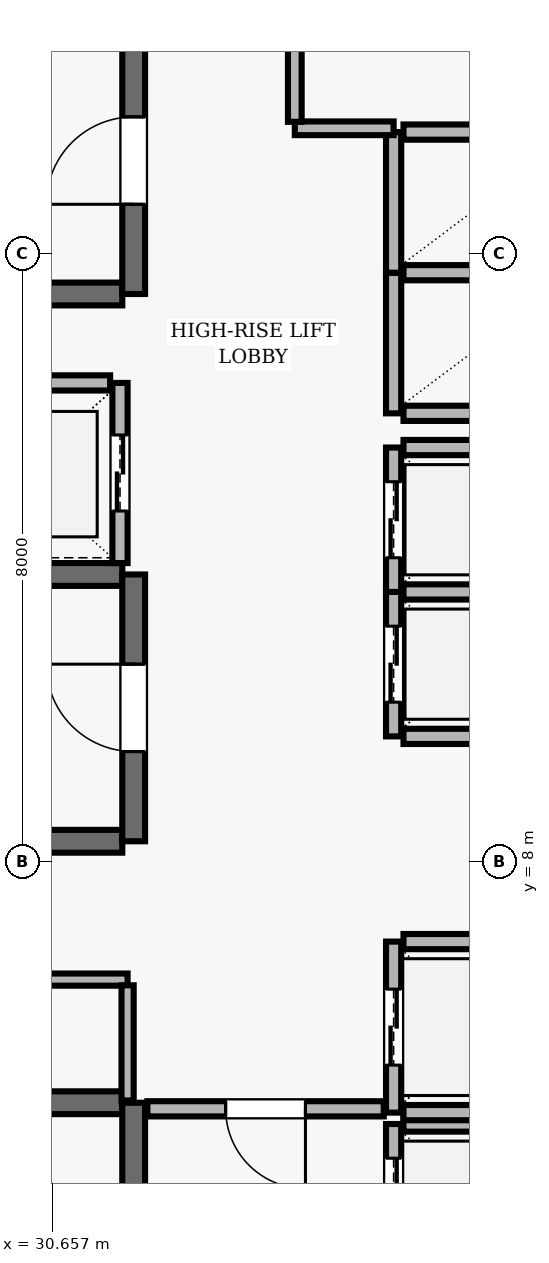
"""IFC4 building model, lengths in metres.
Left out: names, types, materials, properties, quantities, classifications, styles, units other than length and angle.
Written with IfcOpenShell. Run it as: python <this file> out.ifc"""

import sys

from ifc_helpers import new_model, si_unit, direction, frame, frame_2d, origin, place, context, subcontext, project, spatial, rectangle, extrude, element, fill, save


model = new_model("IFC4")
c1 = context("Model", 3, precision=1e-05, world=origin(), true_north=direction((0.0, 1.0)))
c2 = subcontext(c1, "Body", "Model", "MODEL_VIEW")
j1 = project(units=[si_unit("LENGTHUNIT", "METRE"), si_unit("PLANEANGLEUNIT", "RADIAN")], contexts=[c1])
p1 = place(None, origin())
s1 = spatial("IfcSite", under=j1, at=p1, CompositionType="ELEMENT")
p2 = place(p1, origin())
s2 = spatial("IfcBuilding", under=s1, at=p2, CompositionType="ELEMENT")
p3 = place(p2, frame((0.0, 0.0, 283.3)))
s3 = spatial("IfcBuildingStorey", under=s2, at=p3, CompositionType="ELEMENT", Elevation=283.3)
p4 = place(p3, frame((31.58, 4.83, 0.0), z_axis=(0.0, 0.0, 1.0), x_axis=(-1.0, 0.0, 0.0)))
e1 = element("IfcWall", 1, at=p4, inside=s3, PredefinedType="SHEAR", context=c2, shape_type="SweptSolid", body=[
    extrude(rectangle(XDim=8.36, YDim=0.3, at=frame_2d((4.18, 0.0))), origin(), (0.0, 0.0, 1.0), 3.69),
])
p5 = place(p3, frame((31.73, 0.96, 0.0), z_axis=(0.0, 0.0, 1.0), x_axis=(0.0, 1.0, 0.0)))
e2 = element("IfcWall", 2, at=p5, inside=s3, PredefinedType="SHEAR", context=c2, shape_type="SweptSolid", body=[
    extrude(rectangle(XDim=3.87, YDim=0.3, at=frame_2d((1.935, 0.0))), origin(), (0.0, 0.0, 1.0), 3.69),
])
p6 = place(p5, frame((1.54, 0.0, 0.0)))
e3 = element("IfcOpeningElement", 3, at=p6, cuts=e2, PredefinedType="OPENING", context=c2, shape_type="SweptSolid", body=[
    extrude(rectangle(XDim=1.15, YDim=2.15, at=frame_2d((0.575, 1.075))), frame((0.0, 0.16, 0.0), z_axis=(0.0, -1.0, 0.0), x_axis=(1.0, 0.0, 0.0)), (0.0, 0.0, 1.0), 0.32),
])
p7 = place(p3, frame((23.22, 15.47, 0.0), z_axis=(0.0, 0.0, 1.0), x_axis=(1.0, 0.0, 0.0)))
e4 = element("IfcWall", 4, at=p7, inside=s3, PredefinedType="SHEAR", context=c2, shape_type="SweptSolid", body=[
    extrude(rectangle(XDim=8.36, YDim=0.3, at=frame_2d((4.18, 0.0))), origin(), (0.0, 0.0, 1.0), 3.69),
])
p8 = place(p3, frame((31.73, 15.47, 0.0), z_axis=(0.0, 0.0, 1.0), x_axis=(0.0, 1.0, 0.0)))
e5 = element("IfcWall", 5, at=p8, inside=s3, PredefinedType="SHEAR", context=c2, shape_type="SweptSolid", body=[
    extrude(rectangle(XDim=3.51, YDim=0.3, at=frame_2d((1.755, 0.0))), origin(), (0.0, 0.0, 1.0), 3.69),
])
p9 = place(p8, frame((1.18, 0.0, 0.0)))
e6 = element("IfcOpeningElement", 6, at=p9, cuts=e5, PredefinedType="OPENING", context=c2, shape_type="SweptSolid", body=[
    extrude(rectangle(XDim=1.15, YDim=2.15, at=frame_2d((0.575, 1.075))), frame((0.0, 0.16, 0.0), z_axis=(0.0, -1.0, 0.0), x_axis=(1.0, 0.0, 0.0)), (0.0, 0.0, 1.0), 0.32),
])
for number, where, z_axis, x_axis in (
    (7, (31.58, 11.78, 0.0), (0.0, 0.0, 1.0), (-1.0, 0.0, 0.0)),
    (8, (23.22, 8.27, 0.0), (0.0, 0.0, 1.0), (1.0, 0.0, 0.0)),
):
    element("IfcWall", number, at=place(p3, frame(where, z_axis=z_axis, x_axis=x_axis)), inside=s3, PredefinedType="SHEAR", context=c2, shape_type="SweptSolid", body=[
        extrude(rectangle(XDim=8.36, YDim=0.3, at=frame_2d((4.18, 0.0))), origin(), (0.0, 0.0, 1.0), 3.69),
    ])
p10 = place(p3, frame((31.73, 8.27, 0.0), z_axis=(0.0, 0.0, 1.0), x_axis=(0.0, 1.0, 0.0)))
e9 = element("IfcWall", 9, at=p10, inside=s3, PredefinedType="SHEAR", context=c2, shape_type="SweptSolid", body=[
    extrude(rectangle(XDim=3.51, YDim=0.3, at=frame_2d((1.755, 0.0))), origin(), (0.0, 0.0, 1.0), 3.69),
])
p11 = place(p10, frame((1.18, 0.0, 0.0)))
e10 = element("IfcOpeningElement", 10, at=p11, cuts=e9, PredefinedType="OPENING", context=c2, shape_type="SweptSolid", body=[
    extrude(rectangle(XDim=1.15, YDim=2.15, at=frame_2d((0.575, 1.075))), frame((0.0, 0.16, 0.0), z_axis=(0.0, -1.0, 0.0), x_axis=(1.0, 0.0, 0.0)), (0.0, 0.0, 1.0), 0.32),
])
p12 = place(p3, frame((35.15, 4.55, 0.0), z_axis=(0.0, 0.0, 1.0), x_axis=(0.0, -1.0, 0.0)))
e11 = element("IfcWall", 11, at=p12, inside=s3, PredefinedType="SOLIDWALL", context=c2, shape_type="SweptSolid", body=[
    extrude(rectangle(XDim=2.1, YDim=0.2, at=frame_2d((1.05, 0.0))), origin(), (0.0, 0.0, 1.0), 3.69),
])
p13 = place(p12, frame((0.45, 0.0, 0.0)))
e12 = element("IfcOpeningElement", 12, at=p13, cuts=e11, PredefinedType="OPENING", context=c2, shape_type="SweptSolid", body=[
    extrude(rectangle(XDim=1.2, YDim=2.15, at=frame_2d((0.6, 1.075))), frame((0.0, 0.11, 0.0), z_axis=(0.0, -1.0, 0.0), x_axis=(1.0, 0.0, 0.0)), (0.0, 0.0, 1.0), 0.22),
])
p14 = place(p3, frame((37.42, 4.55, 0.0), z_axis=(0.0, 0.0, 1.0), x_axis=(-1.0, 0.0, 0.0)))
e13 = element("IfcWall", 13, at=p14, inside=s3, PredefinedType="SOLIDWALL", context=c2, shape_type="SweptSolid", body=[
    extrude(rectangle(XDim=2.14, YDim=0.2, at=frame_2d((1.07, 0.0))), origin(), (0.0, 0.0, 1.0), 3.69),
])
p15 = place(p3, frame((35.15, 6.95, 0.0), z_axis=(0.0, 0.0, 1.0), x_axis=(0.0, -1.0, 0.0)))
e14 = element("IfcWall", 14, at=p15, inside=s3, PredefinedType="SOLIDWALL", context=c2, shape_type="SweptSolid", body=[
    extrude(rectangle(XDim=2.25, YDim=0.2, at=frame_2d((1.125, 0.0))), origin(), (0.0, 0.0, 1.0), 3.69),
])
p16 = place(p15, frame((0.625, 0.0, 0.0)))
e15 = element("IfcOpeningElement", 15, at=p16, cuts=e14, PredefinedType="OPENING", context=c2, shape_type="SweptSolid", body=[
    extrude(rectangle(XDim=1.0, YDim=2.1, at=frame_2d((0.5, 1.05))), frame((0.0, 0.11, 0.0), z_axis=(0.0, -1.0, 0.0), x_axis=(1.0, 0.0, 0.0)), (0.0, 0.0, 1.0), 0.22),
])
for number, where, z_axis, x_axis in (
    (16, (35.28, 4.7, 0.0), (0.0, 0.0, 1.0), (1.0, 0.0, 0.0)),
    (17, (37.42, 6.95, 0.0), (0.0, 0.0, 1.0), (-1.0, 0.0, 0.0)),
):
    element("IfcWall", number, at=place(p3, frame(where, z_axis=z_axis, x_axis=x_axis)), inside=s3, PredefinedType="SOLIDWALL", context=c2, shape_type="SweptSolid", body=[
        extrude(rectangle(XDim=2.14, YDim=0.2, at=frame_2d((1.07, 0.0))), origin(), (0.0, 0.0, 1.0), 3.69),
    ])
p17 = place(p3, frame((35.15, 11.55, 0.0), z_axis=(0.0, 0.0, 1.0), x_axis=(0.0, -1.0, 0.0)))
e18 = element("IfcWall", 18, at=p17, inside=s3, PredefinedType="SOLIDWALL", context=c2, shape_type="SweptSolid", body=[
    extrude(rectangle(XDim=1.9, YDim=0.2, at=frame_2d((0.95, 0.0))), origin(), (0.0, 0.0, 1.0), 3.69),
])
p18 = place(p17, frame((0.45, 0.0, 0.0)))
e19 = element("IfcOpeningElement", 19, at=p18, cuts=e18, PredefinedType="OPENING", context=c2, shape_type="SweptSolid", body=[
    extrude(rectangle(XDim=1.0, YDim=2.1, at=frame_2d((0.5, 1.05))), frame((0.0, 0.11, 0.0), z_axis=(0.0, -1.0, 0.0), x_axis=(1.0, 0.0, 0.0)), (0.0, 0.0, 1.0), 0.22),
])
for number, where, z_axis, x_axis in (
    (20, (35.28, 9.65, 0.0), (0.0, 0.0, 1.0), (1.0, 0.0, 0.0)),
    (21, (37.42, 11.55, 0.0), (0.0, 0.0, 1.0), (-1.0, 0.0, 0.0)),
):
    element("IfcWall", number, at=place(p3, frame(where, z_axis=z_axis, x_axis=x_axis)), inside=s3, PredefinedType="SOLIDWALL", context=c2, shape_type="SweptSolid", body=[
        extrude(rectangle(XDim=2.14, YDim=0.2, at=frame_2d((1.07, 0.0))), origin(), (0.0, 0.0, 1.0), 3.69),
    ])
p19 = place(p3, frame((35.15, 13.45, 0.0), z_axis=(0.0, 0.0, 1.0), x_axis=(0.0, -1.0, 0.0)))
e22 = element("IfcWall", 22, at=p19, inside=s3, PredefinedType="SOLIDWALL", context=c2, shape_type="SweptSolid", body=[
    extrude(rectangle(XDim=1.9, YDim=0.2, at=frame_2d((0.95, 0.0))), origin(), (0.0, 0.0, 1.0), 3.69),
])
p20 = place(p19, frame((0.45, 0.0, 0.0)))
e23 = element("IfcOpeningElement", 23, at=p20, cuts=e22, PredefinedType="OPENING", context=c2, shape_type="SweptSolid", body=[
    extrude(rectangle(XDim=1.0, YDim=2.1, at=frame_2d((0.5, 1.05))), frame((0.0, 0.11, 0.0), z_axis=(0.0, -1.0, 0.0), x_axis=(1.0, 0.0, 0.0)), (0.0, 0.0, 1.0), 0.22),
])
p21 = place(p3, frame((37.42, 13.45, 0.0), z_axis=(0.0, 0.0, 1.0), x_axis=(-1.0, 0.0, 0.0)))
e24 = element("IfcWall", 24, at=p21, inside=s3, PredefinedType="SOLIDWALL", context=c2, shape_type="SweptSolid", body=[
    extrude(rectangle(XDim=2.14, YDim=0.2, at=frame_2d((1.07, 0.0))), origin(), (0.0, 0.0, 1.0), 3.69),
])
p22 = place(p3, frame((31.55, 11.93, 0.0), z_axis=(0.0, 0.0, 1.0), x_axis=(0.0, 1.0, 0.0)))
e25 = element("IfcWall", 25, at=p22, inside=s3, PredefinedType="SOLIDWALL", context=c2, shape_type="SweptSolid", body=[
    extrude(rectangle(XDim=2.37, YDim=0.2, at=frame_2d((1.185, 0.0))), origin(), (0.0, 0.0, 1.0), 3.69),
])
p23 = place(p22, frame((0.685, 0.0, 0.0)))
e26 = element("IfcOpeningElement", 26, at=p23, cuts=e25, PredefinedType="OPENING", context=c2, shape_type="SweptSolid", body=[
    extrude(rectangle(XDim=1.0, YDim=2.1, at=frame_2d((0.5, 1.05))), frame((0.0, 0.11, 0.0), z_axis=(0.0, -1.0, 0.0), x_axis=(1.0, 0.0, 0.0)), (0.0, 0.0, 1.0), 0.22),
])
p24 = place(p3, frame((31.42, 14.3, 0.0), z_axis=(0.0, 0.0, 1.0), x_axis=(-1.0, 0.0, 0.0)))
e27 = element("IfcWall", 27, at=p24, inside=s3, PredefinedType="SOLIDWALL", context=c2, shape_type="SweptSolid", body=[
    extrude(rectangle(XDim=2.44, YDim=0.2, at=frame_2d((1.22, 0.0))), origin(), (0.0, 0.0, 1.0), 3.69),
])
p25 = place(p3, frame((35.15, 15.75, 0.0), z_axis=(0.0, 0.0, 1.0), x_axis=(0.0, -1.0, 0.0)))
e28 = element("IfcWall", 28, at=p25, inside=s3, PredefinedType="SOLIDWALL", context=c2, shape_type="SweptSolid", body=[
    extrude(rectangle(XDim=1.85, YDim=0.2, at=frame_2d((0.925, 0.0))), origin(), (0.0, 0.0, 1.0), 3.69),
])
for number, where, z_axis, x_axis in (
    (29, (35.28, 13.9, 0.0), (0.0, 0.0, 1.0), (1.0, 0.0, 0.0)),
    (30, (37.42, 15.75, 0.0), (0.0, 0.0, 1.0), (-1.0, 0.0, 0.0)),
):
    element("IfcWall", number, at=place(p3, frame(where, z_axis=z_axis, x_axis=x_axis)), inside=s3, PredefinedType="SOLIDWALL", context=c2, shape_type="SweptSolid", body=[
        extrude(rectangle(XDim=2.14, YDim=0.2, at=frame_2d((1.07, 0.0))), origin(), (0.0, 0.0, 1.0), 3.69),
    ])
p26 = place(p3, frame((35.15, 17.6, 0.0), z_axis=(0.0, 0.0, 1.0), x_axis=(0.0, -1.0, 0.0)))
e31 = element("IfcWall", 31, at=p26, inside=s3, PredefinedType="SOLIDWALL", context=c2, shape_type="SweptSolid", body=[
    extrude(rectangle(XDim=1.85, YDim=0.2, at=frame_2d((0.925, 0.0))), origin(), (0.0, 0.0, 1.0), 3.69),
])
p27 = place(p3, frame((37.42, 17.6, 0.0), z_axis=(0.0, 0.0, 1.0), x_axis=(-1.0, 0.0, 0.0)))
e32 = element("IfcWall", 32, at=p27, inside=s3, PredefinedType="SOLIDWALL", context=c2, shape_type="SweptSolid", body=[
    extrude(rectangle(XDim=2.14, YDim=0.2, at=frame_2d((1.07, 0.0))), origin(), (0.0, 0.0, 1.0), 3.69),
])
p28 = place(p3, frame((28.55, 6.45, 0.0), z_axis=(0.0, 0.0, 1.0), x_axis=(1.0, 0.0, 0.0)))
e33 = element("IfcWall", 33, at=p28, inside=s3, PredefinedType="PARTITIONING", context=c2, shape_type="SweptSolid", body=[
    extrude(rectangle(XDim=3.1, YDim=0.16, at=frame_2d((1.55, 0.0))), origin(), (0.0, 0.0, 1.0), 3.69),
])
p29 = place(p28, frame((1.11, 0.0, 0.0)))
e34 = element("IfcOpeningElement", 34, at=p29, cuts=e33, PredefinedType="OPENING", context=c2, shape_type="SweptSolid", body=[
    extrude(rectangle(XDim=0.88, YDim=2.1, at=frame_2d((0.44, 1.05))), frame((0.0, 0.09, 0.0), z_axis=(0.0, -1.0, 0.0), x_axis=(1.0, 0.0, 0.0)), (0.0, 0.0, 1.0), 0.18),
])
p30 = place(p3, frame((33.85, 17.65, 0.0), z_axis=(0.0, 0.0, 1.0), x_axis=(1.0, 0.0, 0.0)))
e35 = element("IfcWall", 35, at=p30, inside=s3, PredefinedType="PARTITIONING", context=c2, shape_type="SweptSolid", body=[
    extrude(rectangle(XDim=1.3, YDim=0.18, at=frame_2d((0.65, 0.0))), origin(), (0.0, 0.0, 1.0), 3.69),
])
p31 = place(p3, frame((35.02, 4.75, 0.0), z_axis=(0.0, 0.0, 1.0), x_axis=(-1.0, 0.0, 0.0)))
e36 = element("IfcWall", 36, at=p31, inside=s3, PredefinedType="SOLIDWALL", context=c2, shape_type="SweptSolid", body=[
    extrude(rectangle(XDim=3.11, YDim=0.2, at=frame_2d((1.555, 0.0))), origin(), (0.0, 0.0, 1.0), 3.69),
])
p32 = place(p31, frame((1.03, 0.0, 0.0)))
e37 = element("IfcOpeningElement", 37, at=p32, cuts=e36, PredefinedType="OPENING", context=c2, shape_type="SweptSolid", body=[
    extrude(rectangle(XDim=1.05, YDim=2.15, at=frame_2d((0.525, 1.075))), frame((0.0, 0.11, 0.0), z_axis=(0.0, -1.0, 0.0), x_axis=(1.0, 0.0, 0.0)), (0.0, 0.0, 1.0), 0.22),
])
p33 = place(p3, frame((31.65, 4.86, 0.0), z_axis=(0.0, 0.0, 1.0), x_axis=(0.0, 1.0, 0.0)))
e38 = element("IfcWall", 38, at=p33, inside=s3, PredefinedType="PARTITIONING", context=c2, shape_type="SweptSolid", body=[
    extrude(rectangle(XDim=1.515, YDim=0.16, at=frame_2d((0.757, 0.0))), origin(), (0.0, 0.0, 1.0), 3.69),
])
p34 = place(p3, frame((33.85, 17.735, 0.0), z_axis=(0.0, 0.0, 1.0), x_axis=(0.0, 1.0, 0.0)))
e39 = element("IfcWall", 39, at=p34, inside=s3, PredefinedType="PARTITIONING", context=c2, shape_type="SweptSolid", body=[
    extrude(rectangle(XDim=6.03, YDim=0.18, at=frame_2d((3.015, 0.0))), origin(), (0.0, 0.0, 1.0), 3.69),
])
p35 = place(p34, frame((2.54, 0.0, 0.0)))
e40 = element("IfcOpeningElement", 40, at=p35, cuts=e39, PredefinedType="OPENING", context=c2, shape_type="SweptSolid", body=[
    extrude(rectangle(XDim=0.95, YDim=2.1, at=frame_2d((0.475, 1.05))), frame((0.0, 0.1, 0.0), z_axis=(0.0, -1.0, 0.0), x_axis=(1.0, 0.0, 0.0)), (0.0, 0.0, 1.0), 0.2),
])
p36 = place(p9, origin())
e41 = element("IfcDoor", 41, at=p36, inside=s3, OperationType="SINGLE_SWING_LEFT", PredefinedType="DOOR", context=c2, shape_type="SweptSolid", body=[
    extrude(rectangle(XDim=1.15, YDim=2.15, at=frame_2d((0.575, 1.075))), frame((0.0, 0.025, 0.0), z_axis=(0.0, -1.0, 0.0), x_axis=(1.0, 0.0, 0.0)), (0.0, 0.0, 1.0), 0.05),
])
fill(e6, e41)
p37 = place(p11, origin())
e42 = element("IfcDoor", 42, at=p37, inside=s3, OperationType="SINGLE_SWING_RIGHT", PredefinedType="DOOR", context=c2, shape_type="SweptSolid", body=[
    extrude(rectangle(XDim=1.15, YDim=2.15, at=frame_2d((0.575, 1.075))), frame((0.0, 0.025, 0.0), z_axis=(0.0, -1.0, 0.0), x_axis=(1.0, 0.0, 0.0)), (0.0, 0.0, 1.0), 0.05),
])
fill(e10, e42)
p38 = place(p13, origin())
e43 = element("IfcDoor", 43, at=p38, inside=s3, OperationType="DOUBLE_DOOR_SLIDING", PredefinedType="DOOR", context=c2, shape_type="SweptSolid", body=[
    extrude(rectangle(XDim=1.2, YDim=2.15, at=frame_2d((0.6, 1.075))), frame((0.0, 0.025, 0.0), z_axis=(0.0, -1.0, 0.0), x_axis=(1.0, 0.0, 0.0)), (0.0, 0.0, 1.0), 0.05),
])
fill(e12, e43)
p39 = place(p16, origin())
e44 = element("IfcDoor", 44, at=p39, inside=s3, OperationType="DOUBLE_DOOR_SLIDING", PredefinedType="DOOR", context=c2, shape_type="SweptSolid", body=[
    extrude(rectangle(XDim=1.0, YDim=2.1, at=frame_2d((0.5, 1.05))), frame((0.0, 0.025, 0.0), z_axis=(0.0, -1.0, 0.0), x_axis=(1.0, 0.0, 0.0)), (0.0, 0.0, 1.0), 0.05),
])
fill(e15, e44)
p40 = place(p18, origin())
e45 = element("IfcDoor", 45, at=p40, inside=s3, OperationType="DOUBLE_DOOR_SLIDING", PredefinedType="DOOR", context=c2, shape_type="SweptSolid", body=[
    extrude(rectangle(XDim=1.0, YDim=2.1, at=frame_2d((0.5, 1.05))), frame((0.0, 0.025, 0.0), z_axis=(0.0, -1.0, 0.0), x_axis=(1.0, 0.0, 0.0)), (0.0, 0.0, 1.0), 0.05),
])
fill(e19, e45)
p41 = place(p20, origin())
e46 = element("IfcDoor", 46, at=p41, inside=s3, OperationType="DOUBLE_DOOR_SLIDING", PredefinedType="DOOR", context=c2, shape_type="SweptSolid", body=[
    extrude(rectangle(XDim=1.0, YDim=2.1, at=frame_2d((0.5, 1.05))), frame((0.0, 0.025, 0.0), z_axis=(0.0, -1.0, 0.0), x_axis=(1.0, 0.0, 0.0)), (0.0, 0.0, 1.0), 0.05),
])
fill(e23, e46)
p42 = place(p23, origin())
e47 = element("IfcDoor", 47, at=p42, inside=s3, OperationType="DOUBLE_DOOR_SLIDING", PredefinedType="DOOR", context=c2, shape_type="SweptSolid", body=[
    extrude(rectangle(XDim=1.0, YDim=2.1, at=frame_2d((0.5, 1.05))), frame((0.0, 0.025, 0.0), z_axis=(0.0, -1.0, 0.0), x_axis=(1.0, 0.0, 0.0)), (0.0, 0.0, 1.0), 0.05),
])
fill(e26, e47)
p43 = place(p32, origin())
e48 = element("IfcDoor", 48, at=p43, inside=s3, OperationType="SINGLE_SWING_LEFT", PredefinedType="DOOR", context=c2, shape_type="SweptSolid", body=[
    extrude(rectangle(XDim=1.05, YDim=2.15, at=frame_2d((0.525, 1.075))), frame((0.0, 0.025, 0.0), z_axis=(0.0, -1.0, 0.0), x_axis=(1.0, 0.0, 0.0)), (0.0, 0.0, 1.0), 0.05),
])
fill(e37, e48)
save(model, sys.argv[1])
